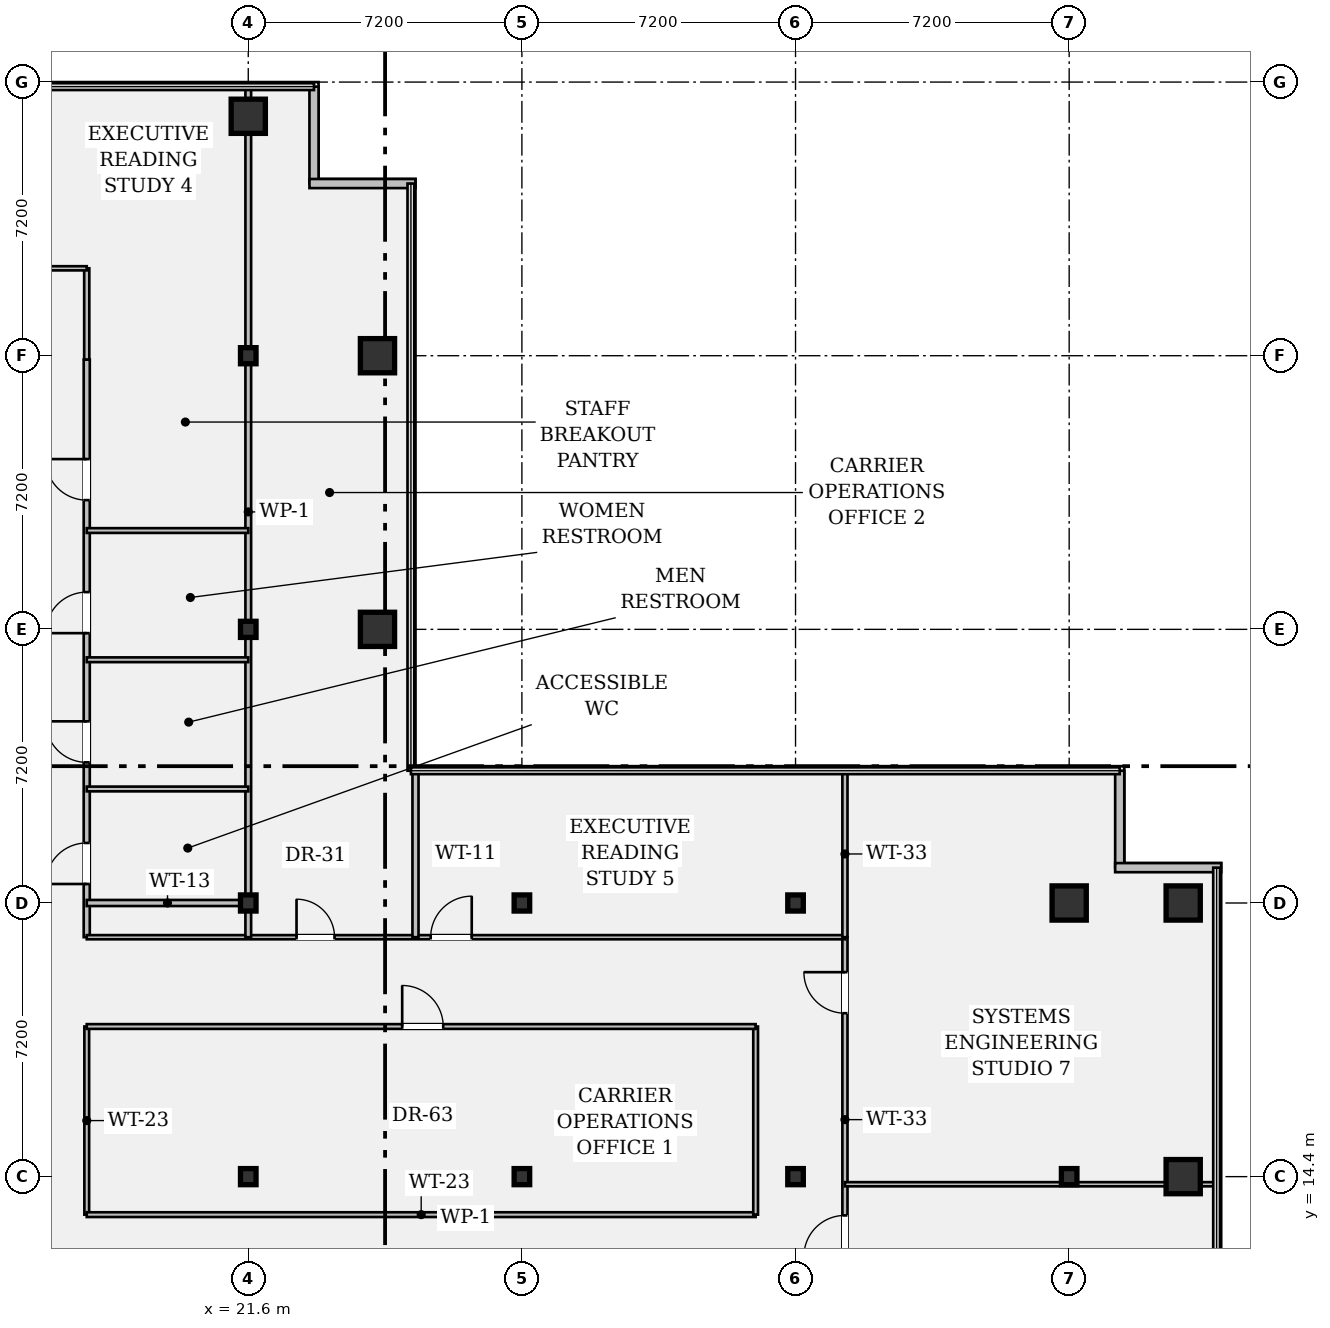
"""IFC4 building model, lengths in metres.
Left out: names, types, materials, properties, quantities, classifications, styles, units other than length and angle.
Written with IfcOpenShell. Run it as: python <this file> out.ifc"""

import sys

from ifc_helpers import new_model, si_unit, direction, frame, frame_2d, origin, origin_2d, place, context, subcontext, project, spatial, rectangle, hollow_rectangle, i_section, extrude, element, fill, save


model = new_model("IFC4")
c1 = context("Model", 3, precision=1e-05, world=origin(), true_north=direction((0.0, 1.0)))
c2 = subcontext(c1, "Body", "Model", "MODEL_VIEW")
j1 = project(units=[si_unit("LENGTHUNIT", "METRE"), si_unit("PLANEANGLEUNIT", "RADIAN")], contexts=[c1])
p1 = place(None, origin())
s1 = spatial("IfcSite", under=j1, at=p1, CompositionType="ELEMENT")
p2 = place(p1, origin())
s2 = spatial("IfcBuilding", under=s1, at=p2, CompositionType="ELEMENT")
p3 = place(p2, frame((0.0, 0.0, 133.0)))
s3 = spatial("IfcBuildingStorey", under=s2, at=p3, CompositionType="ELEMENT", Elevation=133.0)
for number, where, z_axis, x_axis in (
    (1, (21.6, 14.4, 0.0), (0.0, 0.0, 1.0), (1.0, 0.0, 0.0)),
    (2, (21.6, 21.6, 0.0), (0.0, 0.0, 1.0), (1.0, 0.0, 0.0)),
    (3, (21.6, 28.8, 0.0), (0.0, 0.0, 1.0), (1.0, 0.0, 0.0)),
    (4, (21.6, 36.0, 0.0), (0.0, 0.0, 1.0), (1.0, 0.0, 0.0)),
):
    element("IfcColumn", number, at=place(p3, frame(where, z_axis=z_axis, x_axis=x_axis)), inside=s3, PredefinedType="COLUMN", context=c2, shape_type="SweptSolid", body=[
        extrude(i_section(OverallWidth=0.409, OverallDepth=0.424, WebThickness=0.033, FlangeThickness=0.052, FilletRadius=0.018, at=origin_2d()), origin(), (0.0, 0.0, 1.0), 3.58),
    ])
for number, where, z_axis, x_axis in (
    (5, (21.6, 42.3, 0.0), (0.0, 0.0, 1.0), (1.0, 0.0, 0.0)),
    (6, (25.0, 28.8, 0.0), (0.0, 0.0, 1.0), (1.0, 0.0, 0.0)),
    (7, (25.0, 36.0, 0.0), (0.0, 0.0, 1.0), (1.0, 0.0, 0.0)),
):
    element("IfcColumn", number, at=place(p3, frame(where, z_axis=z_axis, x_axis=x_axis)), inside=s3, PredefinedType="COLUMN", context=c2, shape_type="SweptSolid", body=[
        extrude(hollow_rectangle(XDim=0.9, YDim=0.9, WallThickness=0.055, at=origin_2d()), origin(), (0.0, 0.0, 1.0), 3.58),
    ])
for number, where, z_axis, x_axis in (
    (8, (28.8, 14.4, 0.0), (0.0, 0.0, 1.0), (1.0, 0.0, 0.0)),
    (9, (28.8, 21.6, 0.0), (0.0, 0.0, 1.0), (1.0, 0.0, 0.0)),
    (10, (36.0, 14.4, 0.0), (0.0, 0.0, 1.0), (1.0, 0.0, 0.0)),
    (11, (36.0, 21.6, 0.0), (0.0, 0.0, 1.0), (1.0, 0.0, 0.0)),
    (12, (43.2, 14.4, 0.0), (0.0, 0.0, 1.0), (1.0, 0.0, 0.0)),
):
    element("IfcColumn", number, at=place(p3, frame(where, z_axis=z_axis, x_axis=x_axis)), inside=s3, PredefinedType="COLUMN", context=c2, shape_type="SweptSolid", body=[
        extrude(i_section(OverallWidth=0.409, OverallDepth=0.424, WebThickness=0.033, FlangeThickness=0.052, FilletRadius=0.018, at=origin_2d()), origin(), (0.0, 0.0, 1.0), 3.58),
    ])
for number, where, z_axis, x_axis in (
    (13, (43.2, 21.6, 0.0), (0.0, 0.0, 1.0), (1.0, 0.0, 0.0)),
    (14, (46.2, 14.4, 0.0), (0.0, 0.0, 1.0), (1.0, 0.0, 0.0)),
    (15, (46.2, 21.6, 0.0), (0.0, 0.0, 1.0), (1.0, 0.0, 0.0)),
):
    element("IfcColumn", number, at=place(p3, frame(where, z_axis=z_axis, x_axis=x_axis)), inside=s3, PredefinedType="COLUMN", context=c2, shape_type="SweptSolid", body=[
        extrude(hollow_rectangle(XDim=0.9, YDim=0.9, WallThickness=0.055, at=origin_2d()), origin(), (0.0, 0.0, 1.0), 3.58),
    ])
p4 = place(p3, frame((23.33, 43.08, 0.0), z_axis=(0.0, 0.0, 1.0), x_axis=(0.0, -1.0, 0.0)))
e16 = element("IfcWall", 16, at=p4, inside=s3, PredefinedType="STANDARD", context=c2, shape_type="SweptSolid", body=[
    extrude(rectangle(XDim=2.55, YDim=0.24, at=frame_2d((1.275, 0.0))), origin(), (0.0, 0.0, 1.0), 3.58),
])
p5 = place(p3, frame((23.21, 40.53, 0.0), z_axis=(0.0, 0.0, 1.0), x_axis=(1.0, 0.0, 0.0)))
e17 = element("IfcWall", 17, at=p5, inside=s3, PredefinedType="STANDARD", context=c2, shape_type="SweptSolid", body=[
    extrude(rectangle(XDim=2.79, YDim=0.24, at=frame_2d((1.395, 0.0))), origin(), (0.0, 0.0, 1.0), 3.58),
])
p6 = place(p3, frame((44.53, 25.08, 0.0), z_axis=(0.0, 0.0, 1.0), x_axis=(0.0, -1.0, 0.0)))
e18 = element("IfcWall", 18, at=p6, inside=s3, PredefinedType="STANDARD", context=c2, shape_type="SweptSolid", body=[
    extrude(rectangle(XDim=2.55, YDim=0.24, at=frame_2d((1.275, 0.0))), origin(), (0.0, 0.0, 1.0), 3.58),
])
p7 = place(p3, frame((44.41, 22.53, 0.0), z_axis=(0.0, 0.0, 1.0), x_axis=(1.0, 0.0, 0.0)))
e19 = element("IfcWall", 19, at=p7, inside=s3, PredefinedType="STANDARD", context=c2, shape_type="SweptSolid", body=[
    extrude(rectangle(XDim=2.79, YDim=0.24, at=frame_2d((1.395, 0.0))), origin(), (0.0, 0.0, 1.0), 3.58),
])
p8 = place(p3, frame((17.35, 20.7, 0.0), z_axis=(0.0, 0.0, 1.0), x_axis=(0.0, 1.0, 0.0)))
e20 = element("IfcWall", 20, at=p8, inside=s3, PredefinedType="PARTITIONING", context=c2, shape_type="SweptSolid", body=[
    extrude(rectangle(XDim=15.2, YDim=0.16, at=frame_2d((7.6, 0.0))), origin(), (0.0, 0.0, 1.0), 2.869),
])
p9 = place(p8, frame((1.4, 0.0, 0.0)))
e21 = element("IfcOpeningElement", 21, at=p9, cuts=e20, PredefinedType="OPENING", context=c2, shape_type="SweptSolid", body=[
    extrude(rectangle(XDim=1.08, YDim=2.15, at=frame_2d((0.54, 1.075))), frame((0.0, 0.092, 0.0), z_axis=(0.0, -1.0, 0.0), x_axis=(1.0, 0.0, 0.0)), (0.0, 0.0, 1.0), 0.184),
])
p10 = place(p8, frame((4.6, 0.0, 0.0)))
e22 = element("IfcOpeningElement", 22, at=p10, cuts=e20, PredefinedType="OPENING", context=c2, shape_type="SweptSolid", body=[
    extrude(rectangle(XDim=1.08, YDim=2.15, at=frame_2d((0.54, 1.075))), frame((0.0, 0.092, 0.0), z_axis=(0.0, -1.0, 0.0), x_axis=(1.0, 0.0, 0.0)), (0.0, 0.0, 1.0), 0.184),
])
p11 = place(p8, frame((8.0, 0.0, 0.0)))
e23 = element("IfcOpeningElement", 23, at=p11, cuts=e20, PredefinedType="OPENING", context=c2, shape_type="SweptSolid", body=[
    extrude(rectangle(XDim=1.08, YDim=2.15, at=frame_2d((0.54, 1.075))), frame((0.0, 0.092, 0.0), z_axis=(0.0, -1.0, 0.0), x_axis=(1.0, 0.0, 0.0)), (0.0, 0.0, 1.0), 0.184),
])
p12 = place(p8, frame((11.5, 0.0, 0.0)))
e24 = element("IfcOpeningElement", 24, at=p12, cuts=e20, PredefinedType="OPENING", context=c2, shape_type="SweptSolid", body=[
    extrude(rectangle(XDim=1.08, YDim=2.15, at=frame_2d((0.54, 1.075))), frame((0.0, 0.092, 0.0), z_axis=(0.0, -1.0, 0.0), x_axis=(1.0, 0.0, 0.0)), (0.0, 0.0, 1.0), 0.184),
])
p13 = place(p3, frame((37.3, 11.1, 0.0), z_axis=(0.0, 0.0, 1.0), x_axis=(0.0, 1.0, 0.0)))
e25 = element("IfcWall", 25, at=p13, inside=s3, PredefinedType="PARTITIONING", context=c2, shape_type="SweptSolid", body=[
    extrude(rectangle(XDim=9.6, YDim=0.135, at=frame_2d((4.8, 0.0))), origin(), (0.0, 0.0, 1.0), 2.869),
])
p14 = place(p13, frame((1.2, 0.0, 0.0)))
e26 = element("IfcOpeningElement", 26, at=p14, cuts=e25, PredefinedType="OPENING", context=c2, shape_type="SweptSolid", body=[
    extrude(rectangle(XDim=1.08, YDim=2.15, at=frame_2d((0.54, 1.075))), frame((0.0, 0.08, 0.0), z_axis=(0.0, -1.0, 0.0), x_axis=(1.0, 0.0, 0.0)), (0.0, 0.0, 1.0), 0.159),
])
p15 = place(p13, frame((7.6, 0.0, 0.0)))
e27 = element("IfcOpeningElement", 27, at=p15, cuts=e25, PredefinedType="OPENING", context=c2, shape_type="SweptSolid", body=[
    extrude(rectangle(XDim=1.08, YDim=2.15, at=frame_2d((0.54, 1.075))), frame((0.0, 0.08, 0.0), z_axis=(0.0, -1.0, 0.0), x_axis=(1.0, 0.0, 0.0)), (0.0, 0.0, 1.0), 0.159),
])
p16 = place(p3, frame((17.35, 20.7, 0.0), z_axis=(0.0, 0.0, 1.0), x_axis=(1.0, 0.0, 0.0)))
e28 = element("IfcWall", 28, at=p16, inside=s3, PredefinedType="PARTITIONING", context=c2, shape_type="SweptSolid", body=[
    extrude(rectangle(XDim=19.95, YDim=0.11, at=frame_2d((9.975, 0.0))), origin(), (0.0, 0.0, 1.0), 2.869),
])
p17 = place(p16, frame((5.52, 0.0, 0.0)))
e29 = element("IfcOpeningElement", 29, at=p17, cuts=e28, PredefinedType="OPENING", context=c2, shape_type="SweptSolid", body=[
    extrude(rectangle(XDim=1.0, YDim=2.15, at=frame_2d((0.5, 1.075))), frame((0.0, 0.067, 0.0), z_axis=(0.0, -1.0, 0.0), x_axis=(1.0, 0.0, 0.0)), (0.0, 0.0, 1.0), 0.134),
])
p18 = place(p16, frame((9.05, 0.0, 0.0)))
e30 = element("IfcOpeningElement", 30, at=p18, cuts=e28, PredefinedType="OPENING", context=c2, shape_type="SweptSolid", body=[
    extrude(rectangle(XDim=1.08, YDim=2.15, at=frame_2d((0.54, 1.075))), frame((0.0, 0.067, 0.0), z_axis=(0.0, -1.0, 0.0), x_axis=(1.0, 0.0, 0.0)), (0.0, 0.0, 1.0), 0.134),
])
p19 = place(p3, frame((17.35, 13.4, 0.0), z_axis=(0.0, 0.0, 1.0), x_axis=(0.0, 1.0, 0.0)))
e31 = element("IfcWall", 31, at=p19, inside=s3, PredefinedType="PARTITIONING", context=c2, shape_type="SweptSolid", body=[
    extrude(rectangle(XDim=4.95, YDim=0.125, at=frame_2d((2.475, 0.0))), origin(), (0.0, 0.0, 1.0), 2.869),
])
p20 = place(p3, frame((17.35, 13.4, 0.0), z_axis=(0.0, 0.0, 1.0), x_axis=(1.0, 0.0, 0.0)))
e32 = element("IfcWall", 32, at=p20, inside=s3, PredefinedType="PARTITIONING", context=c2, shape_type="SweptSolid", body=[
    extrude(rectangle(XDim=17.6, YDim=0.125, at=frame_2d((8.8, 0.0))), origin(), (0.0, 0.0, 1.0), 2.869),
])
p21 = place(p3, frame((34.95, 13.4, 0.0), z_axis=(0.0, 0.0, 1.0), x_axis=(0.0, 1.0, 0.0)))
e33 = element("IfcWall", 33, at=p21, inside=s3, PredefinedType="PARTITIONING", context=c2, shape_type="SweptSolid", body=[
    extrude(rectangle(XDim=4.95, YDim=0.125, at=frame_2d((2.475, 0.0))), origin(), (0.0, 0.0, 1.0), 2.869),
])
p22 = place(p3, frame((17.35, 18.35, 0.0), z_axis=(0.0, 0.0, 1.0), x_axis=(1.0, 0.0, 0.0)))
e34 = element("IfcWall", 34, at=p22, inside=s3, PredefinedType="PARTITIONING", context=c2, shape_type="SweptSolid", body=[
    extrude(rectangle(XDim=17.6, YDim=0.125, at=frame_2d((8.8, 0.0))), origin(), (0.0, 0.0, 1.0), 2.869),
])
p23 = place(p22, frame((8.3, 0.0, 0.0)))
e35 = element("IfcOpeningElement", 35, at=p23, cuts=e34, PredefinedType="OPENING", context=c2, shape_type="SweptSolid", body=[
    extrude(rectangle(XDim=1.08, YDim=2.15, at=frame_2d((0.54, 1.075))), frame((0.0, 0.074, 0.0), z_axis=(0.0, -1.0, 0.0), x_axis=(1.0, 0.0, 0.0)), (0.0, 0.0, 1.0), 0.149),
])
p24 = place(p3, frame((17.35, 21.6, 0.0), z_axis=(0.0, 0.0, 1.0), x_axis=(1.0, 0.0, 0.0)))
e36 = element("IfcWall", 36, at=p24, inside=s3, PredefinedType="PARTITIONING", context=c2, shape_type="SweptSolid", body=[
    extrude(rectangle(XDim=4.25, YDim=0.16, at=frame_2d((2.125, 0.0))), origin(), (0.0, 0.0, 1.0), 2.869),
])
p25 = place(p3, frame((21.6, 20.7, 0.0), z_axis=(0.0, 0.0, 1.0), x_axis=(0.0, 1.0, 0.0)))
e37 = element("IfcWall", 37, at=p25, inside=s3, PredefinedType="PARTITIONING", context=c2, shape_type="SweptSolid", body=[
    extrude(rectangle(XDim=22.38, YDim=0.15, at=frame_2d((11.19, 0.0))), origin(), (0.0, 0.0, 1.0), 2.869),
])
for number, where, z_axis, x_axis in (
    (38, (17.35, 24.6, 0.0), (0.0, 0.0, 1.0), (1.0, 0.0, 0.0)),
    (39, (17.35, 28.0, 0.0), (0.0, 0.0, 1.0), (1.0, 0.0, 0.0)),
    (40, (17.35, 31.4, 0.0), (0.0, 0.0, 1.0), (1.0, 0.0, 0.0)),
):
    element("IfcWall", number, at=place(p3, frame(where, z_axis=z_axis, x_axis=x_axis)), inside=s3, PredefinedType="PARTITIONING", context=c2, shape_type="SweptSolid", body=[
        extrude(rectangle(XDim=4.25, YDim=0.125, at=frame_2d((2.125, 0.0))), origin(), (0.0, 0.0, 1.0), 2.869),
    ])
p26 = place(p3, frame((17.35, 35.9, 0.0), z_axis=(0.0, 0.0, 1.0), x_axis=(0.0, 1.0, 0.0)))
e41 = element("IfcWall", 41, at=p26, inside=s3, PredefinedType="PARTITIONING", context=c2, shape_type="SweptSolid", body=[
    extrude(rectangle(XDim=2.4, YDim=0.135, at=frame_2d((1.2, 0.0))), origin(), (0.0, 0.0, 1.0), 2.869),
])
p27 = place(p3, frame((14.4, 38.3, 0.0), z_axis=(0.0, 0.0, 1.0), x_axis=(1.0, 0.0, 0.0)))
e42 = element("IfcWall", 42, at=p27, inside=s3, PredefinedType="PARTITIONING", context=c2, shape_type="SweptSolid", body=[
    extrude(rectangle(XDim=2.95, YDim=0.11, at=frame_2d((1.475, 0.0))), origin(), (0.0, 0.0, 1.0), 3.148),
])
p28 = place(p27, frame((0.85, 0.0, 0.0)))
e43 = element("IfcOpeningElement", 43, at=p28, cuts=e42, PredefinedType="OPENING", context=c2, shape_type="SweptSolid", body=[
    extrude(rectangle(XDim=1.08, YDim=2.15, at=frame_2d((0.54, 1.075))), frame((0.0, 0.067, 0.0), z_axis=(0.0, -1.0, 0.0), x_axis=(1.0, 0.0, 0.0)), (0.0, 0.0, 1.0), 0.134),
])
p29 = place(p3, frame((26.0, 20.7, 0.0), z_axis=(0.0, 0.0, 1.0), x_axis=(0.0, 1.0, 0.0)))
e44 = element("IfcWall", 44, at=p29, inside=s3, PredefinedType="PARTITIONING", context=c2, shape_type="SweptSolid", body=[
    extrude(rectangle(XDim=4.38, YDim=0.16, at=frame_2d((2.19, 0.0))), origin(), (0.0, 0.0, 1.0), 2.869),
])
p30 = place(p3, frame((37.3, 20.7, 0.0), z_axis=(0.0, 0.0, 1.0), x_axis=(0.0, 1.0, 0.0)))
e45 = element("IfcWall", 45, at=p30, inside=s3, PredefinedType="PARTITIONING", context=c2, shape_type="SweptSolid", body=[
    extrude(rectangle(XDim=4.38, YDim=0.135, at=frame_2d((2.19, 0.0))), origin(), (0.0, 0.0, 1.0), 2.869),
])
p31 = place(p3, frame((37.3, 14.2, 0.0), z_axis=(0.0, 0.0, 1.0), x_axis=(1.0, 0.0, 0.0)))
e46 = element("IfcWall", 46, at=p31, inside=s3, PredefinedType="PARTITIONING", context=c2, shape_type="SweptSolid", body=[
    extrude(rectangle(XDim=9.78, YDim=0.11, at=frame_2d((4.89, 0.0))), origin(), (0.0, 0.0, 1.0), 2.869),
])
p32 = place(p23, origin())
e47 = element("IfcDoor", 47, at=p32, inside=s3, OperationType="SINGLE_SWING_LEFT", PredefinedType="DOOR", context=c2, shape_type="SweptSolid", body=[
    extrude(rectangle(XDim=1.08, YDim=2.15, at=frame_2d((0.54, 1.075))), frame((0.0, 0.025, 0.0), z_axis=(0.0, -1.0, 0.0), x_axis=(1.0, 0.0, 0.0)), (0.0, 0.0, 1.0), 0.05),
])
fill(e35, e47)
p33 = place(p9, origin())
e48 = element("IfcDoor", 48, at=p33, inside=s3, OperationType="SINGLE_SWING_LEFT", PredefinedType="DOOR", context=c2, shape_type="SweptSolid", body=[
    extrude(rectangle(XDim=1.08, YDim=2.15, at=frame_2d((0.54, 1.075))), frame((0.0, 0.025, 0.0), z_axis=(0.0, -1.0, 0.0), x_axis=(1.0, 0.0, 0.0)), (0.0, 0.0, 1.0), 0.05),
])
fill(e21, e48)
p34 = place(p10, origin())
e49 = element("IfcDoor", 49, at=p34, inside=s3, OperationType="SINGLE_SWING_RIGHT", PredefinedType="DOOR", context=c2, shape_type="SweptSolid", body=[
    extrude(rectangle(XDim=1.08, YDim=2.15, at=frame_2d((0.54, 1.075))), frame((0.0, 0.025, 0.0), z_axis=(0.0, -1.0, 0.0), x_axis=(1.0, 0.0, 0.0)), (0.0, 0.0, 1.0), 0.05),
])
fill(e22, e49)
p35 = place(p11, origin())
e50 = element("IfcDoor", 50, at=p35, inside=s3, OperationType="SINGLE_SWING_LEFT", PredefinedType="DOOR", context=c2, shape_type="SweptSolid", body=[
    extrude(rectangle(XDim=1.08, YDim=2.15, at=frame_2d((0.54, 1.075))), frame((0.0, 0.025, 0.0), z_axis=(0.0, -1.0, 0.0), x_axis=(1.0, 0.0, 0.0)), (0.0, 0.0, 1.0), 0.05),
])
fill(e23, e50)
p36 = place(p12, origin())
e51 = element("IfcDoor", 51, at=p36, inside=s3, OperationType="SINGLE_SWING_RIGHT", PredefinedType="DOOR", context=c2, shape_type="SweptSolid", body=[
    extrude(rectangle(XDim=1.08, YDim=2.15, at=frame_2d((0.54, 1.075))), frame((0.0, 0.025, 0.0), z_axis=(0.0, -1.0, 0.0), x_axis=(1.0, 0.0, 0.0)), (0.0, 0.0, 1.0), 0.05),
])
fill(e24, e51)
p37 = place(p17, origin())
e52 = element("IfcDoor", 52, at=p37, inside=s3, OperationType="SINGLE_SWING_LEFT", PredefinedType="DOOR", context=c2, shape_type="SweptSolid", body=[
    extrude(rectangle(XDim=1.0, YDim=2.15, at=frame_2d((0.5, 1.075))), frame((0.0, 0.025, 0.0), z_axis=(0.0, -1.0, 0.0), x_axis=(1.0, 0.0, 0.0)), (0.0, 0.0, 1.0), 0.05),
])
fill(e29, e52)
p38 = place(p18, origin())
e53 = element("IfcDoor", 53, at=p38, inside=s3, OperationType="SINGLE_SWING_RIGHT", PredefinedType="DOOR", context=c2, shape_type="SweptSolid", body=[
    extrude(rectangle(XDim=1.08, YDim=2.15, at=frame_2d((0.54, 1.075))), frame((0.0, 0.025, 0.0), z_axis=(0.0, -1.0, 0.0), x_axis=(1.0, 0.0, 0.0)), (0.0, 0.0, 1.0), 0.05),
])
fill(e30, e53)
p39 = place(p14, origin())
e54 = element("IfcDoor", 54, at=p39, inside=s3, OperationType="SINGLE_SWING_LEFT", PredefinedType="DOOR", context=c2, shape_type="SweptSolid", body=[
    extrude(rectangle(XDim=1.08, YDim=2.15, at=frame_2d((0.54, 1.075))), frame((0.0, 0.025, 0.0), z_axis=(0.0, -1.0, 0.0), x_axis=(1.0, 0.0, 0.0)), (0.0, 0.0, 1.0), 0.05),
])
fill(e26, e54)
p40 = place(p15, origin())
e55 = element("IfcDoor", 55, at=p40, inside=s3, OperationType="SINGLE_SWING_RIGHT", PredefinedType="DOOR", context=c2, shape_type="SweptSolid", body=[
    extrude(rectangle(XDim=1.08, YDim=2.15, at=frame_2d((0.54, 1.075))), frame((0.0, 0.025, 0.0), z_axis=(0.0, -1.0, 0.0), x_axis=(1.0, 0.0, 0.0)), (0.0, 0.0, 1.0), 0.05),
])
fill(e27, e55)
save(model, sys.argv[1])
